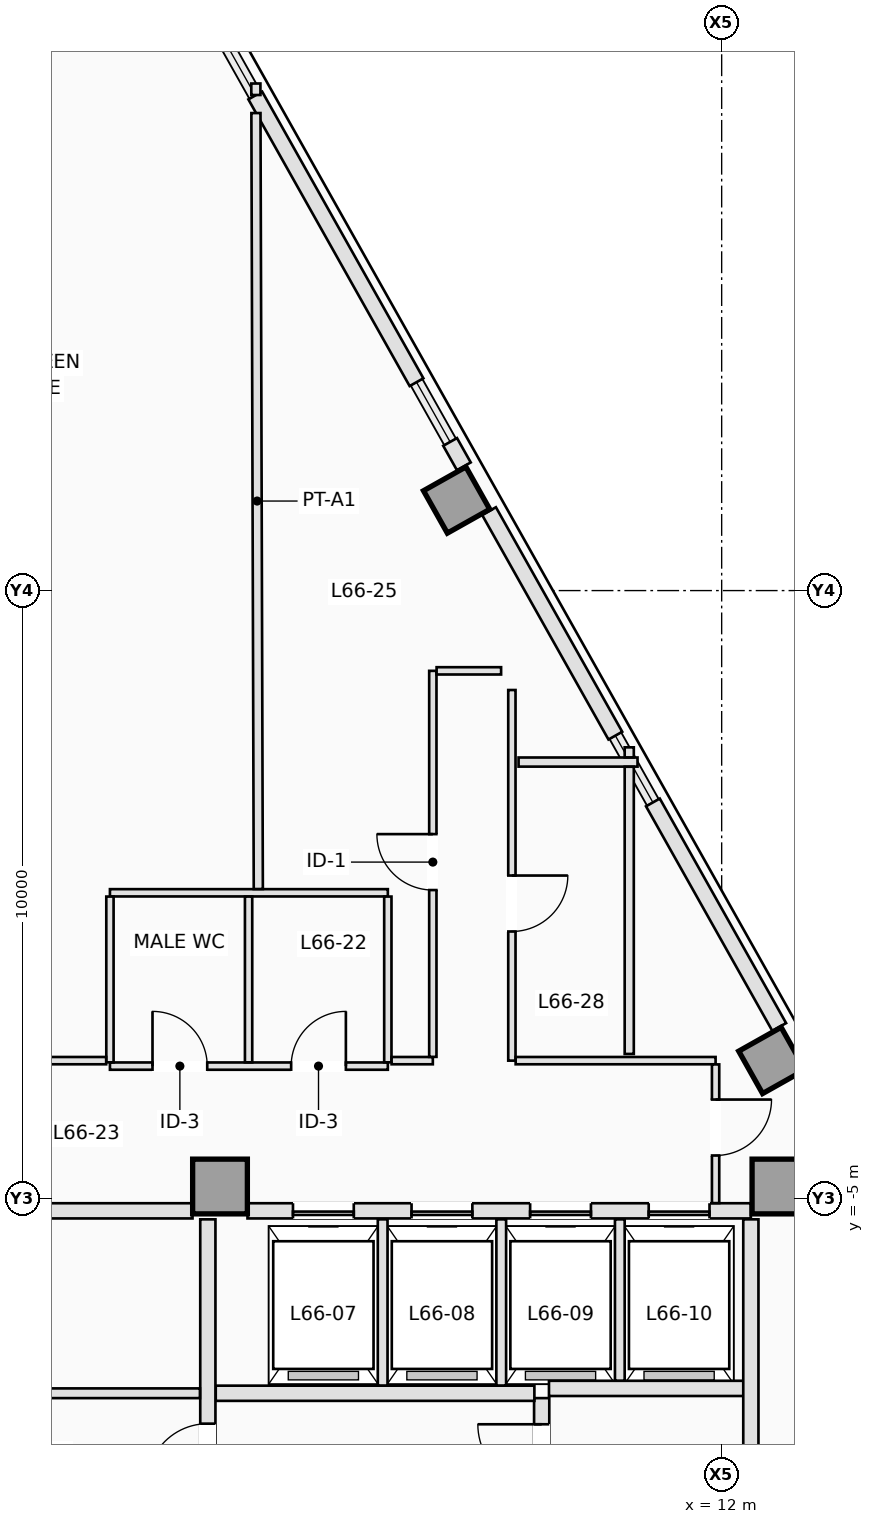
"""IFC4 building model, lengths in metres.
Left out: names, types, materials, properties, quantities, classifications, styles, units other than length and angle.
Written with IfcOpenShell. Run it as: python <this file> out.ifc"""

import sys

from ifc_helpers import new_model, si_unit, direction, frame, frame_2d, origin, origin_2d, place, context, subcontext, project, spatial, rectangle, extrude, element, fill, save


model = new_model("IFC4")
c1 = context("Model", 3, precision=1e-05, world=origin(), true_north=direction((0.0, 1.0)))
c2 = subcontext(c1, "Body", "Model", "MODEL_VIEW")
j1 = project(units=[si_unit("LENGTHUNIT", "METRE"), si_unit("PLANEANGLEUNIT", "RADIAN")], contexts=[c1])
p1 = place(None, origin())
s1 = spatial("IfcSite", under=j1, at=p1, CompositionType="ELEMENT")
p2 = place(p1, origin())
s2 = spatial("IfcBuilding", under=s1, at=p2, CompositionType="ELEMENT")
p3 = place(p2, frame((0.0, 0.0, 239.4)))
s3 = spatial("IfcBuildingStorey", under=s2, at=p3, CompositionType="ELEMENT", Elevation=239.4)
for number, where, z_axis, x_axis in (
    (1, (3.75, -4.8, 0.0), (0.0, 0.0, 1.0), (1.0, 0.0, 0.0)),
    (2, (12.95, -4.8, 0.0), (0.0, 0.0, 1.0), (1.0, 0.0, 0.0)),
):
    element("IfcColumn", number, at=place(p3, frame(where, z_axis=z_axis, x_axis=x_axis)), inside=s3, PredefinedType="COLUMN", context=c2, shape_type="SweptSolid", body=[
        extrude(rectangle(XDim=0.9, YDim=0.9, at=origin_2d()), origin(), (0.0, 0.0, 1.0), 3.5),
    ])
for number, where, z_axis, x_axis in (
    (3, (12.825, -2.727, 0.0), (0.0, 0.0, 1.0), (0.872, 0.49, 0.0)),
    (4, (7.642, 6.489, 0.0), (0.0, 0.0, 1.0), (0.872, 0.49, 0.0)),
):
    element("IfcColumn", number, at=place(p3, frame(where, z_axis=z_axis, x_axis=x_axis)), inside=s3, PredefinedType="COLUMN", context=c2, shape_type="SweptSolid", body=[
        extrude(rectangle(XDim=0.8, YDim=0.8, at=origin_2d()), origin(), (0.0, 0.0, 1.0), 3.5),
    ])
p4 = place(p3, frame((4.33, 13.142, 0.0), z_axis=(0.0, 0.0, 1.0), x_axis=(0.490265525523, -0.871573126297, 0.0)))
e5 = element("IfcWall", 5, at=p4, inside=s3, PredefinedType="STANDARD", context=c2, shape_type="SweptSolid", body=[
    extrude(rectangle(XDim=5.409, YDim=0.26, at=frame_2d((2.705, 0.0))), origin(), (0.0, 0.0, 1.0), 3.25),
])
p5 = place(p3, frame((7.534, 7.445, 0.0), z_axis=(0.0, 0.0, 1.0), x_axis=(0.490412424957, -0.871490478116, 0.0)))
e6 = element("IfcWall", 6, at=p5, inside=s3, PredefinedType="STANDARD", context=c2, shape_type="SweptSolid", body=[
    extrude(rectangle(XDim=0.46, YDim=0.26, at=frame_2d((0.23, 0.0))), origin(), (0.0, 0.0, 1.0), 3.25),
])
p6 = place(p3, frame((8.174, 6.307, 0.0), z_axis=(0.0, 0.0, 1.0), x_axis=(0.490269447258, -0.871570920284, 0.0)))
e7 = element("IfcWall", 7, at=p6, inside=s3, PredefinedType="STANDARD", context=c2, shape_type="SweptSolid", body=[
    extrude(rectangle(XDim=4.237, YDim=0.26, at=frame_2d((2.118, 0.0))), origin(), (0.0, 0.0, 1.0), 3.25),
])
p7 = place(p3, frame((10.869, 1.516, 0.0), z_axis=(0.0, 0.0, 1.0), x_axis=(0.490244825075, -0.871584770109, 0.0)))
e8 = element("IfcWall", 8, at=p7, inside=s3, PredefinedType="STANDARD", context=c2, shape_type="SweptSolid", body=[
    extrude(rectangle(XDim=4.237, YDim=0.26, at=frame_2d((2.119, 0.0))), origin(), (0.0, 0.0, 1.0), 3.25),
])
p8 = place(p3, frame((9.04, -10.18, 0.0), z_axis=(0.0, 0.0, 1.0), x_axis=(0.0, 1.0, 0.0)))
e9 = element("IfcWall", 9, at=p8, inside=s3, PredefinedType="PARTITIONING", context=c2, shape_type="SweptSolid", body=[
    extrude(rectangle(XDim=1.9, YDim=0.25, at=frame_2d((0.95, 0.0))), origin(), (0.0, 0.0, 1.0), 3.25),
])
p9 = place(p8, frame((0.42, 0.0, 0.0)))
e10 = element("IfcOpeningElement", 10, at=p9, cuts=e9, PredefinedType="OPENING", context=c2, shape_type="SweptSolid", body=[
    extrude(rectangle(XDim=1.05, YDim=2.15, at=frame_2d((0.525, 1.075))), frame((0.0, 0.135, 0.0), z_axis=(0.0, -1.0, 0.0), x_axis=(1.0, 0.0, 0.0)), (0.0, 0.0, 1.0), 0.27),
])
p10 = place(p3, frame((9.16, -8.12, 0.0), z_axis=(0.0, 0.0, 1.0), x_axis=(1.0, 0.0, 0.0)))
e11 = element("IfcWall", 11, at=p10, inside=s3, PredefinedType="PARTITIONING", context=c2, shape_type="SweptSolid", body=[
    extrude(rectangle(XDim=3.22, YDim=0.25, at=frame_2d((1.61, 0.0))), origin(), (0.0, 0.0, 1.0), 3.25),
])
p11 = place(p3, frame((12.48, -10.18, 0.0), z_axis=(0.0, 0.0, 1.0), x_axis=(0.0, 1.0, 0.0)))
e12 = element("IfcWall", 12, at=p11, inside=s3, PredefinedType="PARTITIONING", context=c2, shape_type="SweptSolid", body=[
    extrude(rectangle(XDim=4.84, YDim=0.25, at=frame_2d((2.42, 0.0))), origin(), (0.0, 0.0, 1.0), 3.25),
])
p12 = place(p3, frame((3.68, -8.2, 0.0), z_axis=(0.0, 0.0, 1.0), x_axis=(1.0, 0.0, 0.0)))
e13 = element("IfcWall", 13, at=p12, inside=s3, PredefinedType="PARTITIONING", context=c2, shape_type="SweptSolid", body=[
    extrude(rectangle(XDim=5.24, YDim=0.25, at=frame_2d((2.62, 0.0))), origin(), (0.0, 0.0, 1.0), 3.25),
])
p13 = place(p3, frame((3.55, -15.898, 0.0), z_axis=(0.0, 0.0, 1.0), x_axis=(0.0, 1.0, 0.0)))
e14 = element("IfcWall", 14, at=p13, inside=s3, PredefinedType="PARTITIONING", context=c2, shape_type="SweptSolid", body=[
    extrude(rectangle(XDim=10.558, YDim=0.25, at=frame_2d((5.279, 0.0))), origin(), (0.0, 0.0, 1.0), 3.25),
])
p14 = place(p13, frame((6.198, 0.0, 0.0)))
e15 = element("IfcOpeningElement", 15, at=p14, cuts=e14, PredefinedType="OPENING", context=c2, shape_type="SweptSolid", body=[
    extrude(rectangle(XDim=1.0, YDim=2.15, at=frame_2d((0.5, 1.075))), frame((0.0, 0.135, 0.0), z_axis=(0.0, -1.0, 0.0), x_axis=(1.0, 0.0, 0.0)), (0.0, 0.0, 1.0), 0.27),
])
p15 = place(p3, frame((4.202, -5.2, 0.0), z_axis=(0.0, 0.0, 1.0), x_axis=(1.0, 0.0, 0.0)))
e16 = element("IfcWall", 16, at=p15, inside=s3, PredefinedType="PARTITIONING", context=c2, shape_type="SweptSolid", body=[
    extrude(rectangle(XDim=8.278, YDim=0.25, at=frame_2d((4.139, 0.0))), origin(), (0.0, 0.0, 1.0), 3.25),
])
p16 = place(p15, frame((0.748, 0.0, 0.0)))
e17 = element("IfcOpeningElement", 17, at=p16, cuts=e16, PredefinedType="OPENING", context=c2, shape_type="SweptSolid", body=[
    extrude(rectangle(XDim=1.0, YDim=2.15, at=frame_2d((0.5, 1.075))), frame((0.0, 0.135, 0.0), z_axis=(0.0, -1.0, 0.0), x_axis=(1.0, 0.0, 0.0)), (0.0, 0.0, 1.0), 0.27),
])
p17 = place(p15, frame((2.698, 0.0, 0.0)))
e18 = element("IfcOpeningElement", 18, at=p17, cuts=e16, PredefinedType="OPENING", context=c2, shape_type="SweptSolid", body=[
    extrude(rectangle(XDim=1.0, YDim=2.15, at=frame_2d((0.5, 1.075))), frame((0.0, 0.135, 0.0), z_axis=(0.0, -1.0, 0.0), x_axis=(1.0, 0.0, 0.0)), (0.0, 0.0, 1.0), 0.27),
])
p18 = place(p15, frame((4.648, 0.0, 0.0)))
e19 = element("IfcOpeningElement", 19, at=p18, cuts=e16, PredefinedType="OPENING", context=c2, shape_type="SweptSolid", body=[
    extrude(rectangle(XDim=1.0, YDim=2.15, at=frame_2d((0.5, 1.075))), frame((0.0, 0.135, 0.0), z_axis=(0.0, -1.0, 0.0), x_axis=(1.0, 0.0, 0.0)), (0.0, 0.0, 1.0), 0.27),
])
p19 = place(p15, frame((6.598, 0.0, 0.0)))
e20 = element("IfcOpeningElement", 20, at=p19, cuts=e16, PredefinedType="OPENING", context=c2, shape_type="SweptSolid", body=[
    extrude(rectangle(XDim=1.0, YDim=2.15, at=frame_2d((0.5, 1.075))), frame((0.0, 0.135, 0.0), z_axis=(0.0, -1.0, 0.0), x_axis=(1.0, 0.0, 0.0)), (0.0, 0.0, 1.0), 0.27),
])
p20 = place(p3, frame((0.95, -5.2, 0.0), z_axis=(0.0, 0.0, 1.0), x_axis=(1.0, 0.0, 0.0)))
e21 = element("IfcWall", 21, at=p20, inside=s3, PredefinedType="PARTITIONING", context=c2, shape_type="SweptSolid", body=[
    extrude(rectangle(XDim=2.348, YDim=0.25, at=frame_2d((1.174, 0.0))), origin(), (0.0, 0.0, 1.0), 3.25),
])
for number, where, z_axis, x_axis in (
    (22, (6.425, -8.073, 0.0), (0.0, 0.0, 1.0), (0.0, 1.0, 0.0)),
    (23, (8.375, -8.073, 0.0), (0.0, 0.0, 1.0), (0.0, 1.0, 0.0)),
):
    element("IfcWall", number, at=place(p3, frame(where, z_axis=z_axis, x_axis=x_axis)), inside=s3, PredefinedType="PARTITIONING", context=c2, shape_type="SweptSolid", body=[
        extrude(rectangle(XDim=2.733, YDim=0.16, at=frame_2d((1.366, 0.0))), origin(), (0.0, 0.0, 1.0), 3.25),
    ])
p21 = place(p3, frame((10.325, -7.993, 0.0), z_axis=(0.0, 0.0, 1.0), x_axis=(0.0, 1.0, 0.0)))
e24 = element("IfcWall", 24, at=p21, inside=s3, PredefinedType="PARTITIONING", context=c2, shape_type="SweptSolid", body=[
    extrude(rectangle(XDim=2.653, YDim=0.16, at=frame_2d((1.326, 0.0))), origin(), (0.0, 0.0, 1.0), 3.25),
])
p22 = place(p3, frame((-3.42, -8.2, 0.0), z_axis=(0.0, 0.0, 1.0), x_axis=(1.0, 0.0, 0.0)))
e25 = element("IfcWall", 25, at=p22, inside=s3, PredefinedType="PARTITIONING", context=c2, shape_type="SweptSolid", body=[
    extrude(rectangle(XDim=6.84, YDim=0.16, at=frame_2d((3.42, 0.0))), origin(), (0.0, 0.0, 1.0), 3.25),
])
p23 = place(p22, frame((2.92, 0.0, 0.0)))
e26 = element("IfcOpeningElement", 26, at=p23, cuts=e25, PredefinedType="OPENING", context=c2, shape_type="SweptSolid", body=[
    extrude(rectangle(XDim=1.0, YDim=2.15, at=frame_2d((0.5, 1.075))), frame((0.0, 0.09, 0.0), z_axis=(0.0, -1.0, 0.0), x_axis=(1.0, 0.0, 0.0)), (0.0, 0.0, 1.0), 0.18),
])
p24 = place(p3, frame((1.94, -2.82, 0.0), z_axis=(0.0, 0.0, 1.0), x_axis=(1.0, 0.0, 0.0)))
e27 = element("IfcWall", 27, at=p24, inside=s3, PredefinedType="PARTITIONING", context=c2, shape_type="SweptSolid", body=[
    extrude(rectangle(XDim=4.57, YDim=0.12, at=frame_2d((2.285, 0.0))), origin(), (0.0, 0.0, 1.0), 2.943),
])
p25 = place(p24, frame((0.7, 0.0, 0.0)))
e28 = element("IfcOpeningElement", 28, at=p25, cuts=e27, PredefinedType="OPENING", context=c2, shape_type="SweptSolid", body=[
    extrude(rectangle(XDim=0.9, YDim=2.12, at=frame_2d((0.45, 1.06))), frame((0.0, 0.07, 0.0), z_axis=(0.0, -1.0, 0.0), x_axis=(1.0, 0.0, 0.0)), (0.0, 0.0, 1.0), 0.14),
])
p26 = place(p24, frame((2.98, 0.0, 0.0)))
e29 = element("IfcOpeningElement", 29, at=p26, cuts=e27, PredefinedType="OPENING", context=c2, shape_type="SweptSolid", body=[
    extrude(rectangle(XDim=0.9, YDim=2.12, at=frame_2d((0.45, 1.06))), frame((0.0, 0.07, 0.0), z_axis=(0.0, -1.0, 0.0), x_axis=(1.0, 0.0, 0.0)), (0.0, 0.0, 1.0), 0.14),
])
p27 = place(p3, frame((1.94, 0.03, 0.0), z_axis=(0.0, 0.0, 1.0), x_axis=(1.0, 0.0, 0.0)))
e30 = element("IfcWall", 30, at=p27, inside=s3, PredefinedType="PARTITIONING", context=c2, shape_type="SweptSolid", body=[
    extrude(rectangle(XDim=4.57, YDim=0.12, at=frame_2d((2.285, 0.0))), origin(), (0.0, 0.0, 1.0), 3.25),
])
for number, where, z_axis, x_axis in (
    (31, (1.94, -2.758, 0.0), (0.0, 0.0, 1.0), (0.0, 1.0, 0.0)),
    (32, (4.22, -2.758, 0.0), (0.0, 0.0, 1.0), (0.0, 1.0, 0.0)),
    (33, (6.51, -2.758, 0.0), (0.0, 0.0, 1.0), (0.0, 1.0, 0.0)),
):
    element("IfcWall", number, at=place(p3, frame(where, z_axis=z_axis, x_axis=x_axis)), inside=s3, PredefinedType="PARTITIONING", context=c2, shape_type="SweptSolid", body=[
        extrude(rectangle(XDim=2.726, YDim=0.12, at=frame_2d((1.363, 0.0))), origin(), (0.0, 0.0, 1.0), 3.25),
    ])
p28 = place(p3, frame((-1.478, -2.73, 0.0), z_axis=(0.0, 0.0, 1.0), x_axis=(1.0, 0.0, 0.0)))
e34 = element("IfcWall", 34, at=p28, inside=s3, PredefinedType="PARTITIONING", context=c2, shape_type="SweptSolid", body=[
    extrude(rectangle(XDim=3.356, YDim=0.12, at=frame_2d((1.678, 0.0))), origin(), (0.0, 0.0, 1.0), 2.943),
])
p29 = place(p28, frame((1.218, 0.0, 0.0)))
e35 = element("IfcOpeningElement", 35, at=p29, cuts=e34, PredefinedType="OPENING", context=c2, shape_type="SweptSolid", body=[
    extrude(rectangle(XDim=0.92, YDim=2.12, at=frame_2d((0.46, 1.06))), frame((0.0, 0.07, 0.0), z_axis=(0.0, -1.0, 0.0), x_axis=(1.0, 0.0, 0.0)), (0.0, 0.0, 1.0), 0.14),
])
p30 = place(p3, frame((6.572, -2.73, 0.0), z_axis=(0.0, 0.0, 1.0), x_axis=(1.0, 0.0, 0.0)))
e36 = element("IfcWall", 36, at=p30, inside=s3, PredefinedType="PARTITIONING", context=c2, shape_type="SweptSolid", body=[
    extrude(rectangle(XDim=0.678, YDim=0.12, at=frame_2d((0.339, 0.0))), origin(), (0.0, 0.0, 1.0), 3.25),
])
p31 = place(p3, frame((7.25, -2.668, 0.0), z_axis=(0.0, 0.0, 1.0), x_axis=(0.0, 1.0, 0.0)))
e37 = element("IfcWall", 37, at=p31, inside=s3, PredefinedType="PARTITIONING", context=c2, shape_type="SweptSolid", body=[
    extrude(rectangle(XDim=6.348, YDim=0.12, at=frame_2d((3.174, 0.0))), origin(), (0.0, 0.0, 1.0), 3.25),
])
p32 = place(p31, frame((2.743, 0.0, 0.0)))
e38 = element("IfcOpeningElement", 38, at=p32, cuts=e37, PredefinedType="OPENING", context=c2, shape_type="SweptSolid", body=[
    extrude(rectangle(XDim=0.92, YDim=2.12, at=frame_2d((0.46, 1.06))), frame((0.0, 0.07, 0.0), z_axis=(0.0, -1.0, 0.0), x_axis=(1.0, 0.0, 0.0)), (0.0, 0.0, 1.0), 0.14),
])
p33 = place(p3, frame((7.312, 3.68, 0.0), z_axis=(0.0, 0.0, 1.0), x_axis=(1.0, 0.0, 0.0)))
e39 = element("IfcWall", 39, at=p33, inside=s3, PredefinedType="PARTITIONING", context=c2, shape_type="SweptSolid", body=[
    extrude(rectangle(XDim=1.061, YDim=0.12, at=frame_2d((0.53, 0.0))), origin(), (0.0, 0.0, 1.0), 3.25),
])
p34 = place(p3, frame((8.55, 3.365, 0.0), z_axis=(0.0, 0.0, 1.0), x_axis=(0.0, -1.0, 0.0)))
e40 = element("IfcWall", 40, at=p34, inside=s3, PredefinedType="PARTITIONING", context=c2, shape_type="SweptSolid", body=[
    extrude(rectangle(XDim=6.095, YDim=0.12, at=frame_2d((3.047, 0.0))), origin(), (0.0, 0.0, 1.0), 3.25),
])
p35 = place(p34, frame((3.051, 0.0, 0.0)))
e41 = element("IfcOpeningElement", 41, at=p35, cuts=e40, PredefinedType="OPENING", context=c2, shape_type="SweptSolid", body=[
    extrude(rectangle(XDim=0.92, YDim=2.12, at=frame_2d((0.46, 1.06))), frame((0.0, 0.07, 0.0), z_axis=(0.0, -1.0, 0.0), x_axis=(1.0, 0.0, 0.0)), (0.0, 0.0, 1.0), 0.14),
])
p36 = place(p3, frame((8.612, -2.73, 0.0), z_axis=(0.0, 0.0, 1.0), x_axis=(1.0, 0.0, 0.0)))
e42 = element("IfcWall", 42, at=p36, inside=s3, PredefinedType="PARTITIONING", context=c2, shape_type="SweptSolid", body=[
    extrude(rectangle(XDim=3.288, YDim=0.12, at=frame_2d((1.644, 0.0))), origin(), (0.0, 0.0, 1.0), 3.25),
])
p37 = place(p3, frame((11.9, -2.792, 0.0), z_axis=(0.0, 0.0, 1.0), x_axis=(0.0, -1.0, 0.0)))
e43 = element("IfcWall", 43, at=p37, inside=s3, PredefinedType="PARTITIONING", context=c2, shape_type="SweptSolid", body=[
    extrude(rectangle(XDim=2.281, YDim=0.12, at=frame_2d((1.141, 0.0))), origin(), (0.0, 0.0, 1.0), 3.25),
])
p38 = place(p37, frame((0.578, 0.0, 0.0)))
e44 = element("IfcOpeningElement", 44, at=p38, cuts=e43, PredefinedType="OPENING", context=c2, shape_type="SweptSolid", body=[
    extrude(rectangle(XDim=0.92, YDim=2.12, at=frame_2d((0.46, 1.06))), frame((0.0, 0.07, 0.0), z_axis=(0.0, -1.0, 0.0), x_axis=(1.0, 0.0, 0.0)), (0.0, 0.0, 1.0), 0.14),
])
p39 = place(p3, frame((4.339, 13.339, 0.0), z_axis=(0.0, 0.0, 1.0), x_axis=(0.003875939878, -0.999992488517, 0.0)))
e45 = element("IfcWall", 45, at=p39, inside=s3, PredefinedType="PARTITIONING", context=c2, shape_type="SweptSolid", body=[
    extrude(rectangle(XDim=0.189, YDim=0.15, at=frame_2d((0.094, 0.0))), origin(), (0.0, 0.0, 1.0), 3.25),
])
p40 = place(p3, frame((4.341, 12.853, 0.0), z_axis=(0.0, 0.0, 1.0), x_axis=(0.003061132057, -0.999995314724, 0.0)))
e46 = element("IfcWall", 46, at=p40, inside=s3, PredefinedType="PARTITIONING", context=c2, shape_type="SweptSolid", body=[
    extrude(rectangle(XDim=12.761, YDim=0.15, at=frame_2d((6.38, 0.0))), origin(), (0.0, 0.0, 1.0), 3.25),
])
p41 = place(p3, frame((10.616, 2.18, 0.0), z_axis=(0.0, 0.0, 1.0), x_axis=(-1.0, 0.0, 0.0)))
e47 = element("IfcWall", 47, at=p41, inside=s3, PredefinedType="PARTITIONING", context=c2, shape_type="SweptSolid", body=[
    extrude(rectangle(XDim=1.956, YDim=0.15, at=frame_2d((0.978, 0.0))), origin(), (0.0, 0.0, 1.0), 3.25),
])
p42 = place(p3, frame((10.48, 2.422, 0.0), z_axis=(0.0, 0.0, 1.0), x_axis=(0.0, -1.0, 0.0)))
e48 = element("IfcWall", 48, at=p42, inside=s3, PredefinedType="PARTITIONING", context=c2, shape_type="SweptSolid", body=[
    extrude(rectangle(XDim=0.165, YDim=0.15, at=frame_2d((0.083, 0.0))), origin(), (0.0, 0.0, 1.0), 3.25),
])
p43 = place(p3, frame((10.48, 2.103, 0.0), z_axis=(0.0, 0.0, 1.0), x_axis=(0.0, -1.0, 0.0)))
e49 = element("IfcWall", 49, at=p43, inside=s3, PredefinedType="PARTITIONING", context=c2, shape_type="SweptSolid", body=[
    extrude(rectangle(XDim=4.723, YDim=0.15, at=frame_2d((2.362, 0.0))), origin(), (0.0, 0.0, 1.0), 3.25),
])
p44 = place(p16, origin())
e50 = element("IfcDoor", 50, at=p44, inside=s3, OperationType="SLIDING_TO_RIGHT", PredefinedType="DOOR", context=c2, shape_type="SweptSolid", body=[
    extrude(rectangle(XDim=1.0, YDim=2.15, at=frame_2d((0.5, 1.075))), frame((0.0, 0.025, 0.0), z_axis=(0.0, -1.0, 0.0), x_axis=(1.0, 0.0, 0.0)), (0.0, 0.0, 1.0), 0.05),
])
fill(e17, e50)
p45 = place(p17, origin())
e51 = element("IfcDoor", 51, at=p45, inside=s3, OperationType="SLIDING_TO_RIGHT", PredefinedType="DOOR", context=c2, shape_type="SweptSolid", body=[
    extrude(rectangle(XDim=1.0, YDim=2.15, at=frame_2d((0.5, 1.075))), frame((0.0, 0.025, 0.0), z_axis=(0.0, -1.0, 0.0), x_axis=(1.0, 0.0, 0.0)), (0.0, 0.0, 1.0), 0.05),
])
fill(e18, e51)
p46 = place(p18, origin())
e52 = element("IfcDoor", 52, at=p46, inside=s3, OperationType="SLIDING_TO_RIGHT", PredefinedType="DOOR", context=c2, shape_type="SweptSolid", body=[
    extrude(rectangle(XDim=1.0, YDim=2.15, at=frame_2d((0.5, 1.075))), frame((0.0, 0.025, 0.0), z_axis=(0.0, -1.0, 0.0), x_axis=(1.0, 0.0, 0.0)), (0.0, 0.0, 1.0), 0.05),
])
fill(e19, e52)
p47 = place(p19, origin())
e53 = element("IfcDoor", 53, at=p47, inside=s3, OperationType="SLIDING_TO_RIGHT", PredefinedType="DOOR", context=c2, shape_type="SweptSolid", body=[
    extrude(rectangle(XDim=1.0, YDim=2.15, at=frame_2d((0.5, 1.075))), frame((0.0, 0.025, 0.0), z_axis=(0.0, -1.0, 0.0), x_axis=(1.0, 0.0, 0.0)), (0.0, 0.0, 1.0), 0.05),
])
fill(e20, e53)
p48 = place(p9, origin())
e54 = element("IfcDoor", 54, at=p48, inside=s3, OperationType="SINGLE_SWING_RIGHT", PredefinedType="DOOR", context=c2, shape_type="SweptSolid", body=[
    extrude(rectangle(XDim=1.05, YDim=2.15, at=frame_2d((0.525, 1.075))), frame((0.0, 0.025, 0.0), z_axis=(0.0, -1.0, 0.0), x_axis=(1.0, 0.0, 0.0)), (0.0, 0.0, 1.0), 0.05),
])
fill(e10, e54)
p49 = place(p14, origin())
e55 = element("IfcDoor", 55, at=p49, inside=s3, OperationType="SINGLE_SWING_LEFT", PredefinedType="DOOR", context=c2, shape_type="SweptSolid", body=[
    extrude(rectangle(XDim=1.0, YDim=2.15, at=frame_2d((0.5, 1.075))), frame((0.0, 0.025, 0.0), z_axis=(0.0, -1.0, 0.0), x_axis=(1.0, 0.0, 0.0)), (0.0, 0.0, 1.0), 0.05),
])
fill(e15, e55)
p50 = place(p25, origin())
e56 = element("IfcDoor", 56, at=p50, inside=s3, OperationType="SINGLE_SWING_LEFT", PredefinedType="DOOR", context=c2, shape_type="SweptSolid", body=[
    extrude(rectangle(XDim=0.9, YDim=2.12, at=frame_2d((0.45, 1.06))), frame((0.0, 0.025, 0.0), z_axis=(0.0, -1.0, 0.0), x_axis=(1.0, 0.0, 0.0)), (0.0, 0.0, 1.0), 0.05),
])
fill(e28, e56)
p51 = place(p26, origin())
e57 = element("IfcDoor", 57, at=p51, inside=s3, OperationType="SINGLE_SWING_RIGHT", PredefinedType="DOOR", context=c2, shape_type="SweptSolid", body=[
    extrude(rectangle(XDim=0.9, YDim=2.12, at=frame_2d((0.45, 1.06))), frame((0.0, 0.025, 0.0), z_axis=(0.0, -1.0, 0.0), x_axis=(1.0, 0.0, 0.0)), (0.0, 0.0, 1.0), 0.05),
])
fill(e29, e57)
p52 = place(p32, origin())
e58 = element("IfcDoor", 58, at=p52, inside=s3, OperationType="SINGLE_SWING_RIGHT", PredefinedType="DOOR", context=c2, shape_type="SweptSolid", body=[
    extrude(rectangle(XDim=0.92, YDim=2.12, at=frame_2d((0.46, 1.06))), frame((0.0, 0.025, 0.0), z_axis=(0.0, -1.0, 0.0), x_axis=(1.0, 0.0, 0.0)), (0.0, 0.0, 1.0), 0.05),
])
fill(e38, e58)
p53 = place(p35, origin())
e59 = element("IfcDoor", 59, at=p53, inside=s3, OperationType="SINGLE_SWING_LEFT", PredefinedType="DOOR", context=c2, shape_type="SweptSolid", body=[
    extrude(rectangle(XDim=0.92, YDim=2.12, at=frame_2d((0.46, 1.06))), frame((0.0, 0.025, 0.0), z_axis=(0.0, -1.0, 0.0), x_axis=(1.0, 0.0, 0.0)), (0.0, 0.0, 1.0), 0.05),
])
fill(e41, e59)
p54 = place(p38, origin())
e60 = element("IfcDoor", 60, at=p54, inside=s3, OperationType="SINGLE_SWING_LEFT", PredefinedType="DOOR", context=c2, shape_type="SweptSolid", body=[
    extrude(rectangle(XDim=0.92, YDim=2.12, at=frame_2d((0.46, 1.06))), frame((0.0, 0.025, 0.0), z_axis=(0.0, -1.0, 0.0), x_axis=(1.0, 0.0, 0.0)), (0.0, 0.0, 1.0), 0.05),
])
fill(e44, e60)
save(model, sys.argv[1])
